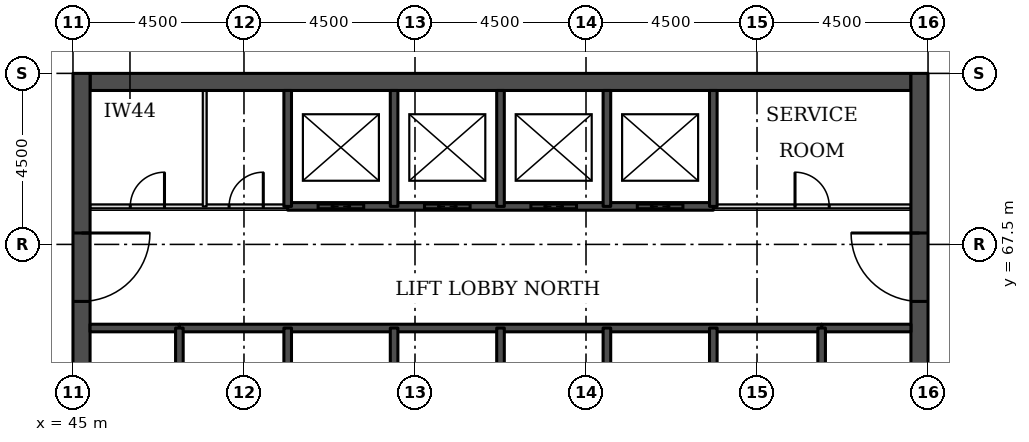
"""IFC4 building model, lengths in metres.
Left out: names, types, materials, properties, quantities, classifications, styles, units other than length and angle.
Written with IfcOpenShell. Run it as: python <this file> out.ifc"""

import sys

from ifc_helpers import new_model, si_unit, direction, frame, frame_2d, origin, place, context, subcontext, project, spatial, rectangle, extrude, element, fill, save


model = new_model("IFC4")
c1 = context("Model", 3, precision=1e-05, world=origin(), true_north=direction((0.0, 1.0)))
c2 = subcontext(c1, "Body", "Model", "MODEL_VIEW")
j1 = project(units=[si_unit("LENGTHUNIT", "METRE"), si_unit("PLANEANGLEUNIT", "RADIAN")], contexts=[c1])
p1 = place(None, origin())
s1 = spatial("IfcSite", under=j1, at=p1, CompositionType="ELEMENT")
p2 = place(p1, origin())
s2 = spatial("IfcBuilding", under=s1, at=p2, CompositionType="ELEMENT")
p3 = place(p2, frame((0.0, 0.0, 82.6)))
s3 = spatial("IfcBuildingStorey", under=s2, at=p3, CompositionType="ELEMENT", Elevation=82.6)
p4 = place(p3, frame((45.45, 71.775, 0.0), z_axis=(0.0, 0.0, 1.0), x_axis=(1.0, 0.0, 0.0)))
e1 = element("IfcWall", 1, at=p4, inside=s3, PredefinedType="SHEAR", context=c2, shape_type="SweptSolid", body=[
    extrude(rectangle(XDim=21.6, YDim=0.45, at=frame_2d((10.8, 0.0))), origin(), (0.0, 0.0, 1.0), 3.7),
])
p5 = place(p3, frame((45.225, 49.5, 0.0), z_axis=(0.0, 0.0, 1.0), x_axis=(0.0, 1.0, 0.0)))
e2 = element("IfcWall", 2, at=p5, inside=s3, PredefinedType="SHEAR", context=c2, shape_type="SweptSolid", body=[
    extrude(rectangle(XDim=22.5, YDim=0.45, at=frame_2d((11.25, 0.0))), origin(), (0.0, 0.0, 1.0), 3.7),
])
p6 = place(p5, frame((4.2, 0.0, 0.0)))
e3 = element("IfcOpeningElement", 3, at=p6, cuts=e2, PredefinedType="OPENING", context=c2, shape_type="SweptSolid", body=[
    extrude(rectangle(XDim=1.8, YDim=2.1, at=frame_2d((0.9, 1.05))), frame((0.0, 0.235, 0.0), z_axis=(0.0, -1.0, 0.0), x_axis=(1.0, 0.0, 0.0)), (0.0, 0.0, 1.0), 0.47),
])
p7 = place(p5, frame((6.9, 0.0, 0.0)))
e4 = element("IfcOpeningElement", 4, at=p7, cuts=e2, PredefinedType="OPENING", context=c2, shape_type="SweptSolid", body=[
    extrude(rectangle(XDim=1.1, YDim=2.1, at=frame_2d((0.55, 1.05))), frame((0.0, 0.235, 0.0), z_axis=(0.0, -1.0, 0.0), x_axis=(1.0, 0.0, 0.0)), (0.0, 0.0, 1.0), 0.47),
])
p8 = place(p5, frame((13.6, 0.0, 0.0)))
e5 = element("IfcOpeningElement", 5, at=p8, cuts=e2, PredefinedType="OPENING", context=c2, shape_type="SweptSolid", body=[
    extrude(rectangle(XDim=1.1, YDim=2.1, at=frame_2d((0.55, 1.05))), frame((0.0, 0.235, 0.0), z_axis=(0.0, -1.0, 0.0), x_axis=(1.0, 0.0, 0.0)), (0.0, 0.0, 1.0), 0.47),
])
p9 = place(p5, frame((16.5, 0.0, 0.0)))
e6 = element("IfcOpeningElement", 6, at=p9, cuts=e2, PredefinedType="OPENING", context=c2, shape_type="SweptSolid", body=[
    extrude(rectangle(XDim=1.8, YDim=2.1, at=frame_2d((0.9, 1.05))), frame((0.0, 0.235, 0.0), z_axis=(0.0, -1.0, 0.0), x_axis=(1.0, 0.0, 0.0)), (0.0, 0.0, 1.0), 0.47),
])
p10 = place(p3, frame((67.275, 49.5, 0.0), z_axis=(0.0, 0.0, 1.0), x_axis=(0.0, 1.0, 0.0)))
e7 = element("IfcWall", 7, at=p10, inside=s3, PredefinedType="SHEAR", context=c2, shape_type="SweptSolid", body=[
    extrude(rectangle(XDim=22.5, YDim=0.45, at=frame_2d((11.25, 0.0))), origin(), (0.0, 0.0, 1.0), 3.7),
])
p11 = place(p10, frame((4.2, 0.0, 0.0)))
e8 = element("IfcOpeningElement", 8, at=p11, cuts=e7, PredefinedType="OPENING", context=c2, shape_type="SweptSolid", body=[
    extrude(rectangle(XDim=1.8, YDim=2.1, at=frame_2d((0.9, 1.05))), frame((0.0, 0.235, 0.0), z_axis=(0.0, -1.0, 0.0), x_axis=(1.0, 0.0, 0.0)), (0.0, 0.0, 1.0), 0.47),
])
p12 = place(p10, frame((6.9, 0.0, 0.0)))
e9 = element("IfcOpeningElement", 9, at=p12, cuts=e7, PredefinedType="OPENING", context=c2, shape_type="SweptSolid", body=[
    extrude(rectangle(XDim=1.1, YDim=2.1, at=frame_2d((0.55, 1.05))), frame((0.0, 0.235, 0.0), z_axis=(0.0, -1.0, 0.0), x_axis=(1.0, 0.0, 0.0)), (0.0, 0.0, 1.0), 0.47),
])
p13 = place(p10, frame((13.6, 0.0, 0.0)))
e10 = element("IfcOpeningElement", 10, at=p13, cuts=e7, PredefinedType="OPENING", context=c2, shape_type="SweptSolid", body=[
    extrude(rectangle(XDim=1.1, YDim=2.1, at=frame_2d((0.55, 1.05))), frame((0.0, 0.235, 0.0), z_axis=(0.0, -1.0, 0.0), x_axis=(1.0, 0.0, 0.0)), (0.0, 0.0, 1.0), 0.47),
])
p14 = place(p10, frame((16.5, 0.0, 0.0)))
e11 = element("IfcOpeningElement", 11, at=p14, cuts=e7, PredefinedType="OPENING", context=c2, shape_type="SweptSolid", body=[
    extrude(rectangle(XDim=1.8, YDim=2.1, at=frame_2d((0.9, 1.05))), frame((0.0, 0.235, 0.0), z_axis=(0.0, -1.0, 0.0), x_axis=(1.0, 0.0, 0.0)), (0.0, 0.0, 1.0), 0.47),
])
for number, where, z_axis, x_axis in (
    (12, (45.45, 65.3, 0.0), (0.0, 0.0, 1.0), (1.0, 0.0, 0.0)),
    (13, (64.7, 65.3, 0.0), (0.0, 0.0, 1.0), (1.0, 0.0, 0.0)),
):
    element("IfcWall", number, at=place(p3, frame(where, z_axis=z_axis, x_axis=x_axis)), inside=s3, PredefinedType="SOLIDWALL", context=c2, shape_type="SweptSolid", body=[
        extrude(rectangle(XDim=2.35, YDim=0.2, at=frame_2d((1.175, 0.0))), origin(), (0.0, 0.0, 1.0), 3.55),
    ])
p15 = place(p3, frame((47.8, 65.3, 0.0), z_axis=(0.0, 0.0, 1.0), x_axis=(1.0, 0.0, 0.0)))
e14 = element("IfcWall", 14, at=p15, inside=s3, PredefinedType="SOLIDWALL", context=c2, shape_type="SweptSolid", body=[
    extrude(rectangle(XDim=16.9, YDim=0.2, at=frame_2d((8.45, 0.0))), origin(), (0.0, 0.0, 1.0), 3.55),
])
p16 = place(p3, frame((45.45, 68.5, 0.0), z_axis=(0.0, 0.0, 1.0), x_axis=(1.0, 0.0, 0.0)))
e15 = element("IfcWall", 15, at=p16, inside=s3, PredefinedType="PARTITIONING", context=c2, shape_type="SweptSolid", body=[
    extrude(rectangle(XDim=5.2, YDim=0.1, at=frame_2d((2.6, 0.0))), origin(), (0.0, 0.0, 1.0), 3.55),
])
p17 = place(p16, frame((1.058, 0.0, 0.0)))
e16 = element("IfcOpeningElement", 16, at=p17, cuts=e15, PredefinedType="OPENING", context=c2, shape_type="SweptSolid", body=[
    extrude(rectangle(XDim=0.9, YDim=2.1, at=frame_2d((0.45, 1.05))), frame((0.0, 0.06, 0.0), z_axis=(0.0, -1.0, 0.0), x_axis=(1.0, 0.0, 0.0)), (0.0, 0.0, 1.0), 0.12),
])
p18 = place(p16, frame((3.658, 0.0, 0.0)))
e17 = element("IfcOpeningElement", 17, at=p18, cuts=e15, PredefinedType="OPENING", context=c2, shape_type="SweptSolid", body=[
    extrude(rectangle(XDim=0.9, YDim=2.1, at=frame_2d((0.45, 1.05))), frame((0.0, 0.06, 0.0), z_axis=(0.0, -1.0, 0.0), x_axis=(1.0, 0.0, 0.0)), (0.0, 0.0, 1.0), 0.12),
])
p19 = place(p3, frame((61.85, 68.5, 0.0), z_axis=(0.0, 0.0, 1.0), x_axis=(1.0, 0.0, 0.0)))
e18 = element("IfcWall", 18, at=p19, inside=s3, PredefinedType="PARTITIONING", context=c2, shape_type="SweptSolid", body=[
    extrude(rectangle(XDim=5.2, YDim=0.1, at=frame_2d((2.6, 0.0))), origin(), (0.0, 0.0, 1.0), 3.55),
])
p20 = place(p19, frame((2.15, 0.0, 0.0)))
e19 = element("IfcOpeningElement", 19, at=p20, cuts=e18, PredefinedType="OPENING", context=c2, shape_type="SweptSolid", body=[
    extrude(rectangle(XDim=0.9, YDim=2.1, at=frame_2d((0.45, 1.05))), frame((0.0, 0.06, 0.0), z_axis=(0.0, -1.0, 0.0), x_axis=(1.0, 0.0, 0.0)), (0.0, 0.0, 1.0), 0.12),
])
p21 = place(p3, frame((50.65, 68.5, 0.0), z_axis=(0.0, 0.0, 1.0), x_axis=(1.0, 0.0, 0.0)))
e20 = element("IfcWall", 20, at=p21, inside=s3, PredefinedType="SOLIDWALL", context=c2, shape_type="SweptSolid", body=[
    extrude(rectangle(XDim=11.2, YDim=0.2, at=frame_2d((5.6, 0.0))), origin(), (0.0, 0.0, 1.0), 3.55),
])
p22 = place(p21, frame((0.8, 0.0, 0.0)))
e21 = element("IfcOpeningElement", 21, at=p22, cuts=e20, PredefinedType="OPENING", context=c2, shape_type="SweptSolid", body=[
    extrude(rectangle(XDim=1.2, YDim=2.1, at=frame_2d((0.6, 1.05))), frame((0.0, 0.11, 0.0), z_axis=(0.0, -1.0, 0.0), x_axis=(1.0, 0.0, 0.0)), (0.0, 0.0, 1.0), 0.22),
])
p23 = place(p21, frame((3.6, 0.0, 0.0)))
e22 = element("IfcOpeningElement", 22, at=p23, cuts=e20, PredefinedType="OPENING", context=c2, shape_type="SweptSolid", body=[
    extrude(rectangle(XDim=1.2, YDim=2.1, at=frame_2d((0.6, 1.05))), frame((0.0, 0.11, 0.0), z_axis=(0.0, -1.0, 0.0), x_axis=(1.0, 0.0, 0.0)), (0.0, 0.0, 1.0), 0.22),
])
p24 = place(p21, frame((6.4, 0.0, 0.0)))
e23 = element("IfcOpeningElement", 23, at=p24, cuts=e20, PredefinedType="OPENING", context=c2, shape_type="SweptSolid", body=[
    extrude(rectangle(XDim=1.2, YDim=2.1, at=frame_2d((0.6, 1.05))), frame((0.0, 0.11, 0.0), z_axis=(0.0, -1.0, 0.0), x_axis=(1.0, 0.0, 0.0)), (0.0, 0.0, 1.0), 0.22),
])
p25 = place(p21, frame((9.2, 0.0, 0.0)))
e24 = element("IfcOpeningElement", 24, at=p25, cuts=e20, PredefinedType="OPENING", context=c2, shape_type="SweptSolid", body=[
    extrude(rectangle(XDim=1.2, YDim=2.1, at=frame_2d((0.6, 1.05))), frame((0.0, 0.11, 0.0), z_axis=(0.0, -1.0, 0.0), x_axis=(1.0, 0.0, 0.0)), (0.0, 0.0, 1.0), 0.22),
])
p26 = place(p3, frame((47.8, 62.0, 0.0), z_axis=(0.0, 0.0, 1.0), x_axis=(0.0, 1.0, 0.0)))
e25 = element("IfcWall", 25, at=p26, inside=s3, PredefinedType="SOLIDWALL", context=c2, shape_type="SweptSolid", body=[
    extrude(rectangle(XDim=3.3, YDim=0.2, at=frame_2d((1.65, 0.0))), origin(), (0.0, 0.0, 1.0), 3.55),
])
p27 = place(p26, frame((1.1, 0.0, 0.0)))
e26 = element("IfcOpeningElement", 26, at=p27, cuts=e25, PredefinedType="OPENING", context=c2, shape_type="SweptSolid", body=[
    extrude(rectangle(XDim=1.1, YDim=2.1, at=frame_2d((0.55, 1.05))), frame((0.0, 0.11, 0.0), z_axis=(0.0, -1.0, 0.0), x_axis=(1.0, 0.0, 0.0)), (0.0, 0.0, 1.0), 0.22),
])
p28 = place(p3, frame((48.466, 68.5, 0.0), z_axis=(0.0, 0.0, 1.0), x_axis=(0.0, 1.0, 0.0)))
e27 = element("IfcWall", 27, at=p28, inside=s3, PredefinedType="PARTITIONING", context=c2, shape_type="SweptSolid", body=[
    extrude(rectangle(XDim=3.05, YDim=0.1, at=frame_2d((1.525, 0.0))), origin(), (0.0, 0.0, 1.0), 3.55),
])
p29 = place(p3, frame((50.65, 62.0, 0.0), z_axis=(0.0, 0.0, 1.0), x_axis=(0.0, 1.0, 0.0)))
e28 = element("IfcWall", 28, at=p29, inside=s3, PredefinedType="SOLIDWALL", context=c2, shape_type="SweptSolid", body=[
    extrude(rectangle(XDim=3.3, YDim=0.2, at=frame_2d((1.65, 0.0))), origin(), (0.0, 0.0, 1.0), 3.55),
])
p30 = place(p3, frame((50.65, 68.5, 0.0), z_axis=(0.0, 0.0, 1.0), x_axis=(0.0, 1.0, 0.0)))
e29 = element("IfcWall", 29, at=p30, inside=s3, PredefinedType="SOLIDWALL", context=c2, shape_type="SweptSolid", body=[
    extrude(rectangle(XDim=3.05, YDim=0.2, at=frame_2d((1.525, 0.0))), origin(), (0.0, 0.0, 1.0), 3.55),
])
p31 = place(p3, frame((53.45, 62.5, 0.0), z_axis=(0.0, 0.0, 1.0), x_axis=(0.0, 1.0, 0.0)))
e30 = element("IfcWall", 30, at=p31, inside=s3, PredefinedType="SOLIDWALL", context=c2, shape_type="SweptSolid", body=[
    extrude(rectangle(XDim=2.8, YDim=0.2, at=frame_2d((1.4, 0.0))), origin(), (0.0, 0.0, 1.0), 3.55),
])
p32 = place(p3, frame((53.45, 68.5, 0.0), z_axis=(0.0, 0.0, 1.0), x_axis=(0.0, 1.0, 0.0)))
e31 = element("IfcWall", 31, at=p32, inside=s3, PredefinedType="SOLIDWALL", context=c2, shape_type="SweptSolid", body=[
    extrude(rectangle(XDim=3.05, YDim=0.2, at=frame_2d((1.525, 0.0))), origin(), (0.0, 0.0, 1.0), 3.55),
])
p33 = place(p3, frame((56.25, 62.5, 0.0), z_axis=(0.0, 0.0, 1.0), x_axis=(0.0, 1.0, 0.0)))
e32 = element("IfcWall", 32, at=p33, inside=s3, PredefinedType="SOLIDWALL", context=c2, shape_type="SweptSolid", body=[
    extrude(rectangle(XDim=2.8, YDim=0.2, at=frame_2d((1.4, 0.0))), origin(), (0.0, 0.0, 1.0), 3.55),
])
p34 = place(p3, frame((56.25, 68.5, 0.0), z_axis=(0.0, 0.0, 1.0), x_axis=(0.0, 1.0, 0.0)))
e33 = element("IfcWall", 33, at=p34, inside=s3, PredefinedType="SOLIDWALL", context=c2, shape_type="SweptSolid", body=[
    extrude(rectangle(XDim=3.05, YDim=0.2, at=frame_2d((1.525, 0.0))), origin(), (0.0, 0.0, 1.0), 3.55),
])
p35 = place(p3, frame((59.05, 62.5, 0.0), z_axis=(0.0, 0.0, 1.0), x_axis=(0.0, 1.0, 0.0)))
e34 = element("IfcWall", 34, at=p35, inside=s3, PredefinedType="SOLIDWALL", context=c2, shape_type="SweptSolid", body=[
    extrude(rectangle(XDim=2.8, YDim=0.2, at=frame_2d((1.4, 0.0))), origin(), (0.0, 0.0, 1.0), 3.55),
])
p36 = place(p3, frame((59.05, 68.5, 0.0), z_axis=(0.0, 0.0, 1.0), x_axis=(0.0, 1.0, 0.0)))
e35 = element("IfcWall", 35, at=p36, inside=s3, PredefinedType="SOLIDWALL", context=c2, shape_type="SweptSolid", body=[
    extrude(rectangle(XDim=3.05, YDim=0.2, at=frame_2d((1.525, 0.0))), origin(), (0.0, 0.0, 1.0), 3.55),
])
p37 = place(p3, frame((61.85, 62.0, 0.0), z_axis=(0.0, 0.0, 1.0), x_axis=(0.0, 1.0, 0.0)))
e36 = element("IfcWall", 36, at=p37, inside=s3, PredefinedType="SOLIDWALL", context=c2, shape_type="SweptSolid", body=[
    extrude(rectangle(XDim=3.3, YDim=0.2, at=frame_2d((1.65, 0.0))), origin(), (0.0, 0.0, 1.0), 3.55),
])
p38 = place(p3, frame((61.85, 68.5, 0.0), z_axis=(0.0, 0.0, 1.0), x_axis=(0.0, 1.0, 0.0)))
e37 = element("IfcWall", 37, at=p38, inside=s3, PredefinedType="SOLIDWALL", context=c2, shape_type="SweptSolid", body=[
    extrude(rectangle(XDim=3.05, YDim=0.2, at=frame_2d((1.525, 0.0))), origin(), (0.0, 0.0, 1.0), 3.55),
])
p39 = place(p3, frame((64.7, 62.0, 0.0), z_axis=(0.0, 0.0, 1.0), x_axis=(0.0, 1.0, 0.0)))
e38 = element("IfcWall", 38, at=p39, inside=s3, PredefinedType="SOLIDWALL", context=c2, shape_type="SweptSolid", body=[
    extrude(rectangle(XDim=3.3, YDim=0.2, at=frame_2d((1.65, 0.0))), origin(), (0.0, 0.0, 1.0), 3.55),
])
p40 = place(p39, frame((1.1, 0.0, 0.0)))
e39 = element("IfcOpeningElement", 39, at=p40, cuts=e38, PredefinedType="OPENING", context=c2, shape_type="SweptSolid", body=[
    extrude(rectangle(XDim=1.1, YDim=2.1, at=frame_2d((0.55, 1.05))), frame((0.0, 0.11, 0.0), z_axis=(0.0, -1.0, 0.0), x_axis=(1.0, 0.0, 0.0)), (0.0, 0.0, 1.0), 0.22),
])
p41 = place(p22, origin())
e40 = element("IfcDoor", 40, at=p41, inside=s3, OperationType="DOUBLE_DOOR_SLIDING", PredefinedType="DOOR", context=c2, shape_type="SweptSolid", body=[
    extrude(rectangle(XDim=1.2, YDim=2.1, at=frame_2d((0.6, 1.05))), frame((0.0, 0.025, 0.0), z_axis=(0.0, -1.0, 0.0), x_axis=(1.0, 0.0, 0.0)), (0.0, 0.0, 1.0), 0.05),
])
fill(e21, e40)
p42 = place(p23, origin())
e41 = element("IfcDoor", 41, at=p42, inside=s3, OperationType="DOUBLE_DOOR_SLIDING", PredefinedType="DOOR", context=c2, shape_type="SweptSolid", body=[
    extrude(rectangle(XDim=1.2, YDim=2.1, at=frame_2d((0.6, 1.05))), frame((0.0, 0.025, 0.0), z_axis=(0.0, -1.0, 0.0), x_axis=(1.0, 0.0, 0.0)), (0.0, 0.0, 1.0), 0.05),
])
fill(e22, e41)
p43 = place(p24, origin())
e42 = element("IfcDoor", 42, at=p43, inside=s3, OperationType="DOUBLE_DOOR_SLIDING", PredefinedType="DOOR", context=c2, shape_type="SweptSolid", body=[
    extrude(rectangle(XDim=1.2, YDim=2.1, at=frame_2d((0.6, 1.05))), frame((0.0, 0.025, 0.0), z_axis=(0.0, -1.0, 0.0), x_axis=(1.0, 0.0, 0.0)), (0.0, 0.0, 1.0), 0.05),
])
fill(e23, e42)
p44 = place(p25, origin())
e43 = element("IfcDoor", 43, at=p44, inside=s3, OperationType="DOUBLE_DOOR_SLIDING", PredefinedType="DOOR", context=c2, shape_type="SweptSolid", body=[
    extrude(rectangle(XDim=1.2, YDim=2.1, at=frame_2d((0.6, 1.05))), frame((0.0, 0.025, 0.0), z_axis=(0.0, -1.0, 0.0), x_axis=(1.0, 0.0, 0.0)), (0.0, 0.0, 1.0), 0.05),
])
fill(e24, e43)
p45 = place(p9, frame((1.8, 0.0, 0.0), z_axis=(0.0, 0.0, 1.0), x_axis=(-1.0, 0.0, 0.0)))
e44 = element("IfcDoor", 44, at=p45, inside=s3, OperationType="SINGLE_SWING_LEFT", PredefinedType="DOOR", context=c2, shape_type="SweptSolid", body=[
    extrude(rectangle(XDim=1.8, YDim=2.1, at=frame_2d((0.9, 1.05))), frame((0.0, 0.025, 0.0), z_axis=(0.0, -1.0, 0.0), x_axis=(1.0, 0.0, 0.0)), (0.0, 0.0, 1.0), 0.05),
])
fill(e6, e44)
p46 = place(p14, origin())
e45 = element("IfcDoor", 45, at=p46, inside=s3, OperationType="SINGLE_SWING_RIGHT", PredefinedType="DOOR", context=c2, shape_type="SweptSolid", body=[
    extrude(rectangle(XDim=1.8, YDim=2.1, at=frame_2d((0.9, 1.05))), frame((0.0, 0.025, 0.0), z_axis=(0.0, -1.0, 0.0), x_axis=(1.0, 0.0, 0.0)), (0.0, 0.0, 1.0), 0.05),
])
fill(e11, e45)
p47 = place(p20, origin())
e46 = element("IfcDoor", 46, at=p47, inside=s3, OperationType="SINGLE_SWING_LEFT", PredefinedType="DOOR", context=c2, shape_type="SweptSolid", body=[
    extrude(rectangle(XDim=0.9, YDim=2.1, at=frame_2d((0.45, 1.05))), frame((0.0, 0.025, 0.0), z_axis=(0.0, -1.0, 0.0), x_axis=(1.0, 0.0, 0.0)), (0.0, 0.0, 1.0), 0.05),
])
fill(e19, e46)
p48 = place(p17, origin())
e47 = element("IfcDoor", 47, at=p48, inside=s3, OperationType="SINGLE_SWING_RIGHT", PredefinedType="DOOR", context=c2, shape_type="SweptSolid", body=[
    extrude(rectangle(XDim=0.9, YDim=2.1, at=frame_2d((0.45, 1.05))), frame((0.0, 0.025, 0.0), z_axis=(0.0, -1.0, 0.0), x_axis=(1.0, 0.0, 0.0)), (0.0, 0.0, 1.0), 0.05),
])
fill(e16, e47)
p49 = place(p18, origin())
e48 = element("IfcDoor", 48, at=p49, inside=s3, OperationType="SINGLE_SWING_RIGHT", PredefinedType="DOOR", context=c2, shape_type="SweptSolid", body=[
    extrude(rectangle(XDim=0.9, YDim=2.1, at=frame_2d((0.45, 1.05))), frame((0.0, 0.025, 0.0), z_axis=(0.0, -1.0, 0.0), x_axis=(1.0, 0.0, 0.0)), (0.0, 0.0, 1.0), 0.05),
])
fill(e17, e48)
save(model, sys.argv[1])
